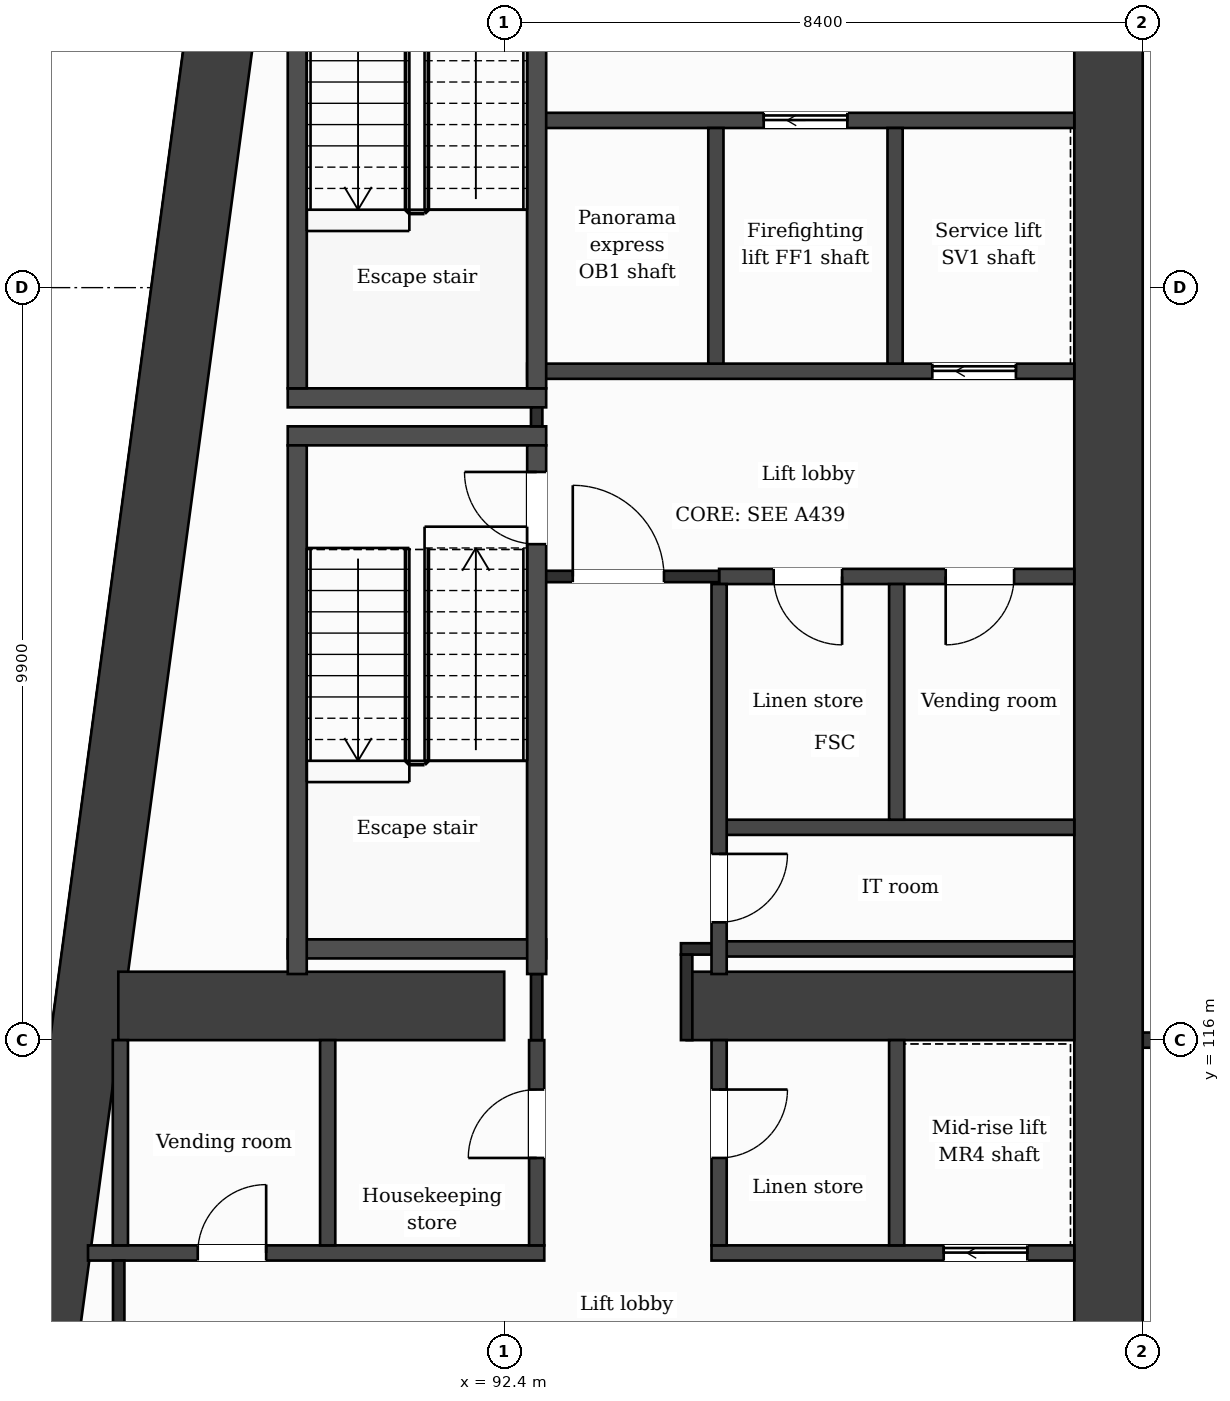
"""IFC4 building model, lengths in metres.
Left out: names, types, materials, properties, quantities, classifications, styles, units other than length and angle.
Written with IfcOpenShell. Run it as: python <this file> out.ifc"""

import sys

from ifc_helpers import new_model, si_unit, direction, frame, frame_2d, origin, place, context, subcontext, project, spatial, rectangle, extrude, element, fill, save


model = new_model("IFC4")
c1 = context("Model", 3, precision=1e-05, world=origin(), true_north=direction((0.0, 1.0)))
c2 = subcontext(c1, "Body", "Model", "MODEL_VIEW")
j1 = project(units=[si_unit("LENGTHUNIT", "METRE"), si_unit("PLANEANGLEUNIT", "RADIAN")], contexts=[c1])
p1 = place(None, origin())
s1 = spatial("IfcSite", under=j1, at=p1, CompositionType="ELEMENT")
p2 = place(p1, origin())
s2 = spatial("IfcBuilding", under=s1, at=p2, CompositionType="ELEMENT")
p3 = place(p2, frame((0.0, 0.0, 162.6)))
s3 = spatial("IfcBuildingStorey", under=s2, at=p3, CompositionType="ELEMENT", Elevation=162.6)
p4 = place(p3, frame((100.35, 131.95, 0.0), z_axis=(0.0, 0.0, 1.0), x_axis=(0.0, -1.0, 0.0)))
e1 = element("IfcWall", 1, at=p4, inside=s3, PredefinedType="SHEAR", context=c2, shape_type="SweptSolid", body=[
    extrude(rectangle(XDim=21.1, YDim=0.9, at=frame_2d((10.55, 0.0))), origin(), (0.0, 0.0, 1.0), 3.7),
])
p5 = place(p3, frame((86.184, 110.85, 0.0), z_axis=(0.0, 0.0, 1.0), x_axis=(0.133410495943, 0.991060865725, 0.0)))
e2 = element("IfcWall", 2, at=p5, inside=s3, PredefinedType="SHEAR", context=c2, shape_type="SweptSolid", body=[
    extrude(rectangle(XDim=21.29, YDim=0.9, at=frame_2d((10.645, 0.0))), origin(), (0.0, 0.0, 1.0), 3.7),
])
p6 = place(p3, frame((87.323, 116.45, 0.0), z_axis=(0.0, 0.0, 1.0), x_axis=(1.0, 0.0, 0.0)))
e3 = element("IfcWall", 3, at=p6, inside=s3, PredefinedType="SHEAR", context=c2, shape_type="SweptSolid", body=[
    extrude(rectangle(XDim=5.077, YDim=0.9, at=frame_2d((2.539, 0.0))), origin(), (0.0, 0.0, 1.0), 3.7),
])
p7 = place(p3, frame((94.8, 116.45, 0.0), z_axis=(0.0, 0.0, 1.0), x_axis=(1.0, 0.0, 0.0)))
e4 = element("IfcWall", 4, at=p7, inside=s3, PredefinedType="SHEAR", context=c2, shape_type="SweptSolid", body=[
    extrude(rectangle(XDim=5.1, YDim=0.9, at=frame_2d((2.55, 0.0))), origin(), (0.0, 0.0, 1.0), 3.7),
])
p8 = place(p3, frame((86.924, 113.2, 0.0), z_axis=(0.0, 0.0, 1.0), x_axis=(1.0, 0.0, 0.0)))
e5 = element("IfcWall", 5, at=p8, inside=s3, PredefinedType="PARTITIONING", context=c2, shape_type="SweptSolid", body=[
    extrude(rectangle(XDim=6.003, YDim=0.2, at=frame_2d((3.001, 0.0))), origin(), (0.0, 0.0, 1.0), 3.38),
])
p9 = place(p8, frame((1.444, 0.0, 0.0)))
e6 = element("IfcOpeningElement", 6, at=p9, cuts=e5, PredefinedType="OPENING", context=c2, shape_type="SweptSolid", body=[
    extrude(rectangle(XDim=0.9, YDim=2.1, at=frame_2d((0.45, 1.05))), frame((0.0, 0.11, 0.0), z_axis=(0.0, -1.0, 0.0), x_axis=(1.0, 0.0, 0.0)), (0.0, 0.0, 1.0), 0.22),
])
p10 = place(p3, frame((95.127, 113.2, 0.0), z_axis=(0.0, 0.0, 1.0), x_axis=(1.0, 0.0, 0.0)))
e7 = element("IfcWall", 7, at=p10, inside=s3, PredefinedType="PARTITIONING", context=c2, shape_type="SweptSolid", body=[
    extrude(rectangle(XDim=4.773, YDim=0.2, at=frame_2d((2.386, 0.0))), origin(), (0.0, 0.0, 1.0), 3.38),
])
p11 = place(p10, frame((3.055, 0.0, 0.0)))
e8 = element("IfcOpeningElement", 8, at=p11, cuts=e7, PredefinedType="OPENING", context=c2, shape_type="SweptSolid", body=[
    extrude(rectangle(XDim=1.1, YDim=2.1, at=frame_2d((0.55, 1.05))), frame((0.0, 0.11, 0.0), z_axis=(0.0, -1.0, 0.0), x_axis=(1.0, 0.0, 0.0)), (0.0, 0.0, 1.0), 0.22),
])
p12 = place(p3, frame((100.8, 116.0, 0.0), z_axis=(0.0, 0.0, 1.0), x_axis=(1.0, 0.0, 0.0)))
e9 = element("IfcWall", 9, at=p12, inside=s3, PredefinedType="PARTITIONING", context=c2, shape_type="SweptSolid", body=[
    extrude(rectangle(XDim=8.4, YDim=0.2, at=frame_2d((4.2, 0.0))), origin(), (0.0, 0.0, 1.0), 3.38),
])
p13 = place(p3, frame((95.227, 117.2, 0.0), z_axis=(0.0, 0.0, 1.0), x_axis=(1.0, 0.0, 0.0)))
e10 = element("IfcWall", 10, at=p13, inside=s3, PredefinedType="PARTITIONING", context=c2, shape_type="SweptSolid", body=[
    extrude(rectangle(XDim=4.673, YDim=0.2, at=frame_2d((2.336, 0.0))), origin(), (0.0, 0.0, 1.0), 3.38),
])
p14 = place(p3, frame((94.725, 117.2, 0.0), z_axis=(0.0, 0.0, 1.0), x_axis=(1.0, 0.0, 0.0)))
e11 = element("IfcWall", 11, at=p14, inside=s3, PredefinedType="PARTITIONING", context=c2, shape_type="SweptSolid", body=[
    extrude(rectangle(XDim=0.502, YDim=0.15, at=frame_2d((0.251, 0.0))), origin(), (0.0, 0.0, 1.0), 3.38),
])
p15 = place(p3, frame((89.552, 117.2, 0.0), z_axis=(0.0, 0.0, 1.0), x_axis=(1.0, 0.0, 0.0)))
e12 = element("IfcWall", 12, at=p15, inside=s3, PredefinedType="PARTITIONING", context=c2, shape_type="SweptSolid", body=[
    extrude(rectangle(XDim=3.4, YDim=0.25, at=frame_2d((1.7, 0.0))), origin(), (0.0, 0.0, 1.0), 3.38),
])
p16 = place(p3, frame((95.227, 118.8, 0.0), z_axis=(0.0, 0.0, 1.0), x_axis=(1.0, 0.0, 0.0)))
e13 = element("IfcWall", 13, at=p16, inside=s3, PredefinedType="PARTITIONING", context=c2, shape_type="SweptSolid", body=[
    extrude(rectangle(XDim=4.673, YDim=0.2, at=frame_2d((2.336, 0.0))), origin(), (0.0, 0.0, 1.0), 3.38),
])
p17 = place(p3, frame((95.227, 122.1, 0.0), z_axis=(0.0, 0.0, 1.0), x_axis=(1.0, 0.0, 0.0)))
e14 = element("IfcWall", 14, at=p17, inside=s3, PredefinedType="PARTITIONING", context=c2, shape_type="SweptSolid", body=[
    extrude(rectangle(XDim=4.673, YDim=0.2, at=frame_2d((2.336, 0.0))), origin(), (0.0, 0.0, 1.0), 3.38),
])
p18 = place(p17, frame((0.718, 0.0, 0.0)))
e15 = element("IfcOpeningElement", 15, at=p18, cuts=e14, PredefinedType="OPENING", context=c2, shape_type="SweptSolid", body=[
    extrude(rectangle(XDim=0.9, YDim=2.1, at=frame_2d((0.45, 1.05))), frame((0.0, 0.11, 0.0), z_axis=(0.0, -1.0, 0.0), x_axis=(1.0, 0.0, 0.0)), (0.0, 0.0, 1.0), 0.22),
])
p19 = place(p17, frame((2.981, 0.0, 0.0)))
e16 = element("IfcOpeningElement", 16, at=p19, cuts=e14, PredefinedType="OPENING", context=c2, shape_type="SweptSolid", body=[
    extrude(rectangle(XDim=0.9, YDim=2.1, at=frame_2d((0.45, 1.05))), frame((0.0, 0.11, 0.0), z_axis=(0.0, -1.0, 0.0), x_axis=(1.0, 0.0, 0.0)), (0.0, 0.0, 1.0), 0.22),
])
p20 = place(p3, frame((92.827, 122.1, 0.0), z_axis=(0.0, 0.0, 1.0), x_axis=(1.0, 0.0, 0.0)))
e17 = element("IfcWall", 17, at=p20, inside=s3, PredefinedType="PARTITIONING", context=c2, shape_type="SweptSolid", body=[
    extrude(rectangle(XDim=2.4, YDim=0.15, at=frame_2d((1.2, 0.0))), origin(), (0.0, 0.0, 1.0), 3.38),
])
p21 = place(p20, frame((0.475, 0.0, 0.0)))
e18 = element("IfcOpeningElement", 18, at=p21, cuts=e17, PredefinedType="OPENING", context=c2, shape_type="SweptSolid", body=[
    extrude(rectangle(XDim=1.2, YDim=2.1, at=frame_2d((0.6, 1.05))), frame((0.0, 0.085, 0.0), z_axis=(0.0, -1.0, 0.0), x_axis=(1.0, 0.0, 0.0)), (0.0, 0.0, 1.0), 0.17),
])
for number, where, z_axis, x_axis in (
    (19, (89.552, 123.95, 0.0), (0.0, 0.0, 1.0), (1.0, 0.0, 0.0)),
    (20, (89.552, 124.45, 0.0), (0.0, 0.0, 1.0), (1.0, 0.0, 0.0)),
):
    element("IfcWall", number, at=place(p3, frame(where, z_axis=z_axis, x_axis=x_axis)), inside=s3, PredefinedType="PARTITIONING", context=c2, shape_type="SweptSolid", body=[
        extrude(rectangle(XDim=3.4, YDim=0.25, at=frame_2d((1.7, 0.0))), origin(), (0.0, 0.0, 1.0), 3.38),
    ])
p22 = place(p3, frame((92.702, 124.8, 0.0), z_axis=(0.0, 0.0, 1.0), x_axis=(1.0, 0.0, 0.0)))
e21 = element("IfcWall", 21, at=p22, inside=s3, PredefinedType="PARTITIONING", context=c2, shape_type="SweptSolid", body=[
    extrude(rectangle(XDim=7.198, YDim=0.2, at=frame_2d((3.599, 0.0))), origin(), (0.0, 0.0, 1.0), 3.38),
])
p23 = place(p22, frame((5.33, 0.0, 0.0)))
e22 = element("IfcOpeningElement", 22, at=p23, cuts=e21, PredefinedType="OPENING", context=c2, shape_type="SweptSolid", body=[
    extrude(rectangle(XDim=1.1, YDim=2.1, at=frame_2d((0.55, 1.05))), frame((0.0, 0.11, 0.0), z_axis=(0.0, -1.0, 0.0), x_axis=(1.0, 0.0, 0.0)), (0.0, 0.0, 1.0), 0.22),
])
p24 = place(p3, frame((92.827, 128.1, 0.0), z_axis=(0.0, 0.0, 1.0), x_axis=(1.0, 0.0, 0.0)))
e23 = element("IfcWall", 23, at=p24, inside=s3, PredefinedType="PARTITIONING", context=c2, shape_type="SweptSolid", body=[
    extrude(rectangle(XDim=7.073, YDim=0.2, at=frame_2d((3.537, 0.0))), origin(), (0.0, 0.0, 1.0), 3.38),
])
p25 = place(p24, frame((2.987, 0.0, 0.0)))
e24 = element("IfcOpeningElement", 24, at=p25, cuts=e23, PredefinedType="OPENING", context=c2, shape_type="SweptSolid", body=[
    extrude(rectangle(XDim=1.1, YDim=2.1, at=frame_2d((0.55, 1.05))), frame((0.0, 0.11, 0.0), z_axis=(0.0, -1.0, 0.0), x_axis=(1.0, 0.0, 0.0)), (0.0, 0.0, 1.0), 0.22),
])
p26 = place(p3, frame((87.35, 113.3, 0.0), z_axis=(0.0, 0.0, 1.0), x_axis=(0.0, 1.0, 0.0)))
e25 = element("IfcWall", 25, at=p26, inside=s3, PredefinedType="PARTITIONING", context=c2, shape_type="SweptSolid", body=[
    extrude(rectangle(XDim=2.7, YDim=0.2, at=frame_2d((1.35, 0.0))), origin(), (0.0, 0.0, 1.0), 3.38),
])
p27 = place(p3, frame((87.328, 111.3, 0.0), z_axis=(0.0, 0.0, 1.0), x_axis=(0.0, 1.0, 0.0)))
e26 = element("IfcWall", 26, at=p27, inside=s3, PredefinedType="PARTITIONING", context=c2, shape_type="SweptSolid", body=[
    extrude(rectangle(XDim=1.8, YDim=0.15, at=frame_2d((0.9, 0.0))), origin(), (0.0, 0.0, 1.0), 3.38),
])
p28 = place(p3, frame((89.677, 116.87, 0.0), z_axis=(0.0, 0.0, 1.0), x_axis=(0.0, 1.0, 0.0)))
e27 = element("IfcWall", 27, at=p28, inside=s3, PredefinedType="PARTITIONING", context=c2, shape_type="SweptSolid", body=[
    extrude(rectangle(XDim=6.955, YDim=0.25, at=frame_2d((3.478, 0.0))), origin(), (0.0, 0.0, 1.0), 3.38),
])
p29 = place(p3, frame((89.677, 124.575, 0.0), z_axis=(0.0, 0.0, 1.0), x_axis=(0.0, 1.0, 0.0)))
e28 = element("IfcWall", 28, at=p29, inside=s3, PredefinedType="PARTITIONING", context=c2, shape_type="SweptSolid", body=[
    extrude(rectangle(XDim=6.955, YDim=0.25, at=frame_2d((3.478, 0.0))), origin(), (0.0, 0.0, 1.0), 3.38),
])
p30 = place(p3, frame((90.077, 113.3, 0.0), z_axis=(0.0, 0.0, 1.0), x_axis=(0.0, 1.0, 0.0)))
e29 = element("IfcWall", 29, at=p30, inside=s3, PredefinedType="PARTITIONING", context=c2, shape_type="SweptSolid", body=[
    extrude(rectangle(XDim=2.7, YDim=0.2, at=frame_2d((1.35, 0.0))), origin(), (0.0, 0.0, 1.0), 3.38),
])
p31 = place(p3, frame((92.827, 113.3, 0.0), z_axis=(0.0, 0.0, 1.0), x_axis=(0.0, 1.0, 0.0)))
e30 = element("IfcWall", 30, at=p31, inside=s3, PredefinedType="PARTITIONING", context=c2, shape_type="SweptSolid", body=[
    extrude(rectangle(XDim=2.7, YDim=0.2, at=frame_2d((1.35, 0.0))), origin(), (0.0, 0.0, 1.0), 3.38),
])
p32 = place(p31, frame((1.15, 0.0, 0.0)))
e31 = element("IfcOpeningElement", 31, at=p32, cuts=e30, PredefinedType="OPENING", context=c2, shape_type="SweptSolid", body=[
    extrude(rectangle(XDim=0.9, YDim=2.1, at=frame_2d((0.45, 1.05))), frame((0.0, 0.11, 0.0), z_axis=(0.0, -1.0, 0.0), x_axis=(1.0, 0.0, 0.0)), (0.0, 0.0, 1.0), 0.22),
])
p33 = place(p3, frame((92.827, 116.0, 0.0), z_axis=(0.0, 0.0, 1.0), x_axis=(0.0, 1.0, 0.0)))
e32 = element("IfcWall", 32, at=p33, inside=s3, PredefinedType="PARTITIONING", context=c2, shape_type="SweptSolid", body=[
    extrude(rectangle(XDim=0.87, YDim=0.15, at=frame_2d((0.435, 0.0))), origin(), (0.0, 0.0, 1.0), 3.38),
])
p34 = place(p3, frame((92.827, 124.075, 0.0), z_axis=(0.0, 0.0, 1.0), x_axis=(0.0, 1.0, 0.0)))
e33 = element("IfcWall", 33, at=p34, inside=s3, PredefinedType="PARTITIONING", context=c2, shape_type="SweptSolid", body=[
    extrude(rectangle(XDim=0.25, YDim=0.15, at=frame_2d((0.125, 0.0))), origin(), (0.0, 0.0, 1.0), 3.38),
])
p35 = place(p3, frame((92.827, 116.87, 0.0), z_axis=(0.0, 0.0, 1.0), x_axis=(0.0, 1.0, 0.0)))
e34 = element("IfcWall", 34, at=p35, inside=s3, PredefinedType="PARTITIONING", context=c2, shape_type="SweptSolid", body=[
    extrude(rectangle(XDim=6.955, YDim=0.25, at=frame_2d((3.478, 0.0))), origin(), (0.0, 0.0, 1.0), 3.38),
])
p36 = place(p35, frame((5.655, 0.0, 0.0)))
e35 = element("IfcOpeningElement", 35, at=p36, cuts=e34, PredefinedType="OPENING", context=c2, shape_type="SweptSolid", body=[
    extrude(rectangle(XDim=0.95, YDim=2.1, at=frame_2d((0.475, 1.05))), frame((0.0, 0.135, 0.0), z_axis=(0.0, -1.0, 0.0), x_axis=(1.0, 0.0, 0.0)), (0.0, 0.0, 1.0), 0.27),
])
p37 = place(p3, frame((92.827, 124.575, 0.0), z_axis=(0.0, 0.0, 1.0), x_axis=(0.0, 1.0, 0.0)))
e36 = element("IfcWall", 36, at=p37, inside=s3, PredefinedType="PARTITIONING", context=c2, shape_type="SweptSolid", body=[
    extrude(rectangle(XDim=6.955, YDim=0.25, at=frame_2d((3.478, 0.0))), origin(), (0.0, 0.0, 1.0), 3.38),
])
p38 = place(p37, frame((5.325, 0.0, 0.0)))
e37 = element("IfcOpeningElement", 37, at=p38, cuts=e36, PredefinedType="OPENING", context=c2, shape_type="SweptSolid", body=[
    extrude(rectangle(XDim=1.0, YDim=2.1, at=frame_2d((0.5, 1.05))), frame((0.0, 0.135, 0.0), z_axis=(0.0, -1.0, 0.0), x_axis=(1.0, 0.0, 0.0)), (0.0, 0.0, 1.0), 0.27),
])
p39 = place(p3, frame((94.8, 116.0, 0.0), z_axis=(0.0, 0.0, 1.0), x_axis=(0.0, 1.0, 0.0)))
e38 = element("IfcWall", 38, at=p39, inside=s3, PredefinedType="PARTITIONING", context=c2, shape_type="SweptSolid", body=[
    extrude(rectangle(XDim=1.125, YDim=0.15, at=frame_2d((0.562, 0.0))), origin(), (0.0, 0.0, 1.0), 3.38),
])
p40 = place(p3, frame((95.185, 124.9, 0.0), z_axis=(0.0, 0.0, 1.0), x_axis=(0.0, 1.0, 0.0)))
e39 = element("IfcWall", 39, at=p40, inside=s3, PredefinedType="PARTITIONING", context=c2, shape_type="SweptSolid", body=[
    extrude(rectangle(XDim=3.1, YDim=0.2, at=frame_2d((1.55, 0.0))), origin(), (0.0, 0.0, 1.0), 3.38),
])
p41 = place(p3, frame((95.227, 113.3, 0.0), z_axis=(0.0, 0.0, 1.0), x_axis=(0.0, 1.0, 0.0)))
e40 = element("IfcWall", 40, at=p41, inside=s3, PredefinedType="PARTITIONING", context=c2, shape_type="SweptSolid", body=[
    extrude(rectangle(XDim=2.7, YDim=0.2, at=frame_2d((1.35, 0.0))), origin(), (0.0, 0.0, 1.0), 3.38),
])
p42 = place(p41, frame((1.15, 0.0, 0.0)))
e41 = element("IfcOpeningElement", 41, at=p42, cuts=e40, PredefinedType="OPENING", context=c2, shape_type="SweptSolid", body=[
    extrude(rectangle(XDim=0.9, YDim=2.1, at=frame_2d((0.45, 1.05))), frame((0.0, 0.11, 0.0), z_axis=(0.0, -1.0, 0.0), x_axis=(1.0, 0.0, 0.0)), (0.0, 0.0, 1.0), 0.22),
])
p43 = place(p3, frame((95.227, 116.87, 0.0), z_axis=(0.0, 0.0, 1.0), x_axis=(0.0, 1.0, 0.0)))
e42 = element("IfcWall", 42, at=p43, inside=s3, PredefinedType="PARTITIONING", context=c2, shape_type="SweptSolid", body=[
    extrude(rectangle(XDim=5.13, YDim=0.2, at=frame_2d((2.565, 0.0))), origin(), (0.0, 0.0, 1.0), 3.38),
])
p44 = place(p43, frame((0.68, 0.0, 0.0)))
e43 = element("IfcOpeningElement", 43, at=p44, cuts=e42, PredefinedType="OPENING", context=c2, shape_type="SweptSolid", body=[
    extrude(rectangle(XDim=0.9, YDim=2.1, at=frame_2d((0.45, 1.05))), frame((0.0, 0.11, 0.0), z_axis=(0.0, -1.0, 0.0), x_axis=(1.0, 0.0, 0.0)), (0.0, 0.0, 1.0), 0.22),
])
p45 = place(p3, frame((97.542, 124.9, 0.0), z_axis=(0.0, 0.0, 1.0), x_axis=(0.0, 1.0, 0.0)))
e44 = element("IfcWall", 44, at=p45, inside=s3, PredefinedType="PARTITIONING", context=c2, shape_type="SweptSolid", body=[
    extrude(rectangle(XDim=3.1, YDim=0.2, at=frame_2d((1.55, 0.0))), origin(), (0.0, 0.0, 1.0), 3.38),
])
p46 = place(p3, frame((97.563, 113.3, 0.0), z_axis=(0.0, 0.0, 1.0), x_axis=(0.0, 1.0, 0.0)))
e45 = element("IfcWall", 45, at=p46, inside=s3, PredefinedType="PARTITIONING", context=c2, shape_type="SweptSolid", body=[
    extrude(rectangle(XDim=2.7, YDim=0.2, at=frame_2d((1.35, 0.0))), origin(), (0.0, 0.0, 1.0), 3.38),
])
p47 = place(p3, frame((97.563, 118.9, 0.0), z_axis=(0.0, 0.0, 1.0), x_axis=(0.0, 1.0, 0.0)))
e46 = element("IfcWall", 46, at=p47, inside=s3, PredefinedType="PARTITIONING", context=c2, shape_type="SweptSolid", body=[
    extrude(rectangle(XDim=3.1, YDim=0.2, at=frame_2d((1.55, 0.0))), origin(), (0.0, 0.0, 1.0), 3.38),
])
p48 = place(p21, origin())
e47 = element("IfcDoor", 47, at=p48, inside=s3, OperationType="SINGLE_SWING_LEFT", PredefinedType="DOOR", context=c2, shape_type="SweptSolid", body=[
    extrude(rectangle(XDim=1.2, YDim=2.1, at=frame_2d((0.6, 1.05))), frame((0.0, 0.025, 0.0), z_axis=(0.0, -1.0, 0.0), x_axis=(1.0, 0.0, 0.0)), (0.0, 0.0, 1.0), 0.05),
])
fill(e18, e47)
p49 = place(p25, origin())
e48 = element("IfcDoor", 48, at=p49, inside=s3, OperationType="SLIDING_TO_LEFT", PredefinedType="DOOR", context=c2, shape_type="SweptSolid", body=[
    extrude(rectangle(XDim=1.1, YDim=2.1, at=frame_2d((0.55, 1.05))), frame((0.0, 0.025, 0.0), z_axis=(0.0, -1.0, 0.0), x_axis=(1.0, 0.0, 0.0)), (0.0, 0.0, 1.0), 0.05),
])
fill(e24, e48)
p50 = place(p23, origin())
e49 = element("IfcDoor", 49, at=p50, inside=s3, OperationType="SLIDING_TO_LEFT", PredefinedType="DOOR", context=c2, shape_type="SweptSolid", body=[
    extrude(rectangle(XDim=1.1, YDim=2.1, at=frame_2d((0.55, 1.05))), frame((0.0, 0.025, 0.0), z_axis=(0.0, -1.0, 0.0), x_axis=(1.0, 0.0, 0.0)), (0.0, 0.0, 1.0), 0.05),
])
fill(e22, e49)
p51 = place(p18, origin())
e50 = element("IfcDoor", 50, at=p51, inside=s3, OperationType="SINGLE_SWING_RIGHT", PredefinedType="DOOR", context=c2, shape_type="SweptSolid", body=[
    extrude(rectangle(XDim=0.9, YDim=2.1, at=frame_2d((0.45, 1.05))), frame((0.0, 0.025, 0.0), z_axis=(0.0, -1.0, 0.0), x_axis=(1.0, 0.0, 0.0)), (0.0, 0.0, 1.0), 0.05),
])
fill(e15, e50)
p52 = place(p19, origin())
e51 = element("IfcDoor", 51, at=p52, inside=s3, OperationType="SINGLE_SWING_LEFT", PredefinedType="DOOR", context=c2, shape_type="SweptSolid", body=[
    extrude(rectangle(XDim=0.9, YDim=2.1, at=frame_2d((0.45, 1.05))), frame((0.0, 0.025, 0.0), z_axis=(0.0, -1.0, 0.0), x_axis=(1.0, 0.0, 0.0)), (0.0, 0.0, 1.0), 0.05),
])
fill(e16, e51)
p53 = place(p36, origin())
e52 = element("IfcDoor", 52, at=p53, inside=s3, OperationType="SINGLE_SWING_RIGHT", PredefinedType="DOOR", context=c2, shape_type="SweptSolid", body=[
    extrude(rectangle(XDim=0.95, YDim=2.1, at=frame_2d((0.475, 1.05))), frame((0.0, 0.025, 0.0), z_axis=(0.0, -1.0, 0.0), x_axis=(1.0, 0.0, 0.0)), (0.0, 0.0, 1.0), 0.05),
])
fill(e35, e52)
p54 = place(p44, origin())
e53 = element("IfcDoor", 53, at=p54, inside=s3, OperationType="SINGLE_SWING_RIGHT", PredefinedType="DOOR", context=c2, shape_type="SweptSolid", body=[
    extrude(rectangle(XDim=0.9, YDim=2.1, at=frame_2d((0.45, 1.05))), frame((0.0, 0.025, 0.0), z_axis=(0.0, -1.0, 0.0), x_axis=(1.0, 0.0, 0.0)), (0.0, 0.0, 1.0), 0.05),
])
fill(e43, e53)
p55 = place(p11, origin())
e54 = element("IfcDoor", 54, at=p55, inside=s3, OperationType="SLIDING_TO_LEFT", PredefinedType="DOOR", context=c2, shape_type="SweptSolid", body=[
    extrude(rectangle(XDim=1.1, YDim=2.1, at=frame_2d((0.55, 1.05))), frame((0.0, 0.025, 0.0), z_axis=(0.0, -1.0, 0.0), x_axis=(1.0, 0.0, 0.0)), (0.0, 0.0, 1.0), 0.05),
])
fill(e8, e54)
p56 = place(p9, origin())
e55 = element("IfcDoor", 55, at=p56, inside=s3, OperationType="SINGLE_SWING_RIGHT", PredefinedType="DOOR", context=c2, shape_type="SweptSolid", body=[
    extrude(rectangle(XDim=0.9, YDim=2.1, at=frame_2d((0.45, 1.05))), frame((0.0, 0.025, 0.0), z_axis=(0.0, -1.0, 0.0), x_axis=(1.0, 0.0, 0.0)), (0.0, 0.0, 1.0), 0.05),
])
fill(e6, e55)
p57 = place(p32, origin())
e56 = element("IfcDoor", 56, at=p57, inside=s3, OperationType="SINGLE_SWING_LEFT", PredefinedType="DOOR", context=c2, shape_type="SweptSolid", body=[
    extrude(rectangle(XDim=0.9, YDim=2.1, at=frame_2d((0.45, 1.05))), frame((0.0, 0.025, 0.0), z_axis=(0.0, -1.0, 0.0), x_axis=(1.0, 0.0, 0.0)), (0.0, 0.0, 1.0), 0.05),
])
fill(e31, e56)
p58 = place(p42, origin())
e57 = element("IfcDoor", 57, at=p58, inside=s3, OperationType="SINGLE_SWING_RIGHT", PredefinedType="DOOR", context=c2, shape_type="SweptSolid", body=[
    extrude(rectangle(XDim=0.9, YDim=2.1, at=frame_2d((0.45, 1.05))), frame((0.0, 0.025, 0.0), z_axis=(0.0, -1.0, 0.0), x_axis=(1.0, 0.0, 0.0)), (0.0, 0.0, 1.0), 0.05),
])
fill(e41, e57)
save(model, sys.argv[1])
